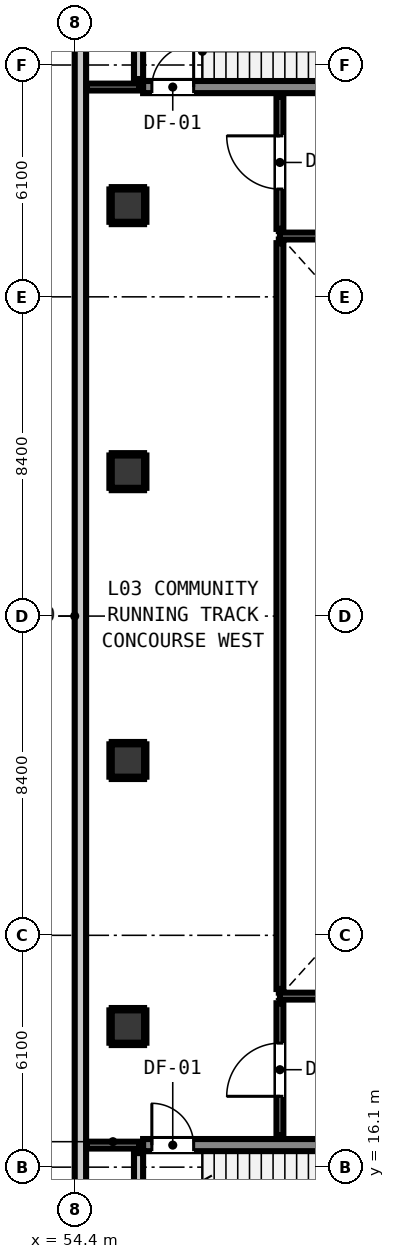
"""IFC4 building model, lengths in metres.
Left out: names, types, materials, properties, quantities, classifications, styles, units other than length and angle.
Written with IfcOpenShell. Run it as: python <this file> out.ifc"""

import sys

from ifc_helpers import new_model, si_unit, direction, frame, frame_2d, origin, origin_2d, place, context, subcontext, project, spatial, rectangle, extrude, element, fill, save


model = new_model("IFC4")
c1 = context("Model", 3, precision=1e-05, world=origin(), true_north=direction((0.0, 1.0)))
c2 = subcontext(c1, "Body", "Model", "MODEL_VIEW")
j1 = project(units=[si_unit("LENGTHUNIT", "METRE"), si_unit("PLANEANGLEUNIT", "RADIAN")], contexts=[c1])
p1 = place(None, origin())
s1 = spatial("IfcSite", under=j1, at=p1, CompositionType="ELEMENT")
p2 = place(p1, origin())
s2 = spatial("IfcBuilding", under=s1, at=p2, CompositionType="ELEMENT")
p3 = place(p2, frame((0.0, 0.0, 13.6)))
s3 = spatial("IfcBuildingStorey", under=s2, at=p3, CompositionType="ELEMENT", Elevation=13.6)
p4 = place(p3, frame((56.2, 16.68, 0.0), z_axis=(0.0, 0.0, 1.0), x_axis=(1.0, 0.0, 0.0)))
e1 = element("IfcWall", 1, at=p4, inside=s3, PredefinedType="SHEAR", context=c2, shape_type="SweptSolid", body=[
    extrude(rectangle(XDim=8.4, YDim=0.32, at=frame_2d((4.2, 0.0))), origin(), (0.0, 0.0, 1.0), 4.2),
])
p5 = place(p4, frame((0.23, 0.0, 0.0)))
e2 = element("IfcOpeningElement", 2, at=p5, cuts=e1, PredefinedType="OPENING", context=c2, shape_type="SweptSolid", body=[
    extrude(rectangle(XDim=1.1, YDim=2.15, at=frame_2d((0.55, 1.075))), frame((0.0, 0.17, 0.0), z_axis=(0.0, -1.0, 0.0), x_axis=(1.0, 0.0, 0.0)), (0.0, 0.0, 1.0), 0.34),
])
p6 = place(p3, frame((56.2, 44.52, 0.0), z_axis=(0.0, 0.0, 1.0), x_axis=(1.0, 0.0, 0.0)))
e3 = element("IfcWall", 3, at=p6, inside=s3, PredefinedType="SHEAR", context=c2, shape_type="SweptSolid", body=[
    extrude(rectangle(XDim=8.4, YDim=0.32, at=frame_2d((4.2, 0.0))), origin(), (0.0, 0.0, 1.0), 4.2),
])
p7 = place(p6, frame((0.23, 0.0, 0.0)))
e4 = element("IfcOpeningElement", 4, at=p7, cuts=e3, PredefinedType="OPENING", context=c2, shape_type="SweptSolid", body=[
    extrude(rectangle(XDim=1.1, YDim=2.15, at=frame_2d((0.55, 1.075))), frame((0.0, 0.17, 0.0), z_axis=(0.0, -1.0, 0.0), x_axis=(1.0, 0.0, 0.0)), (0.0, 0.0, 1.0), 0.34),
])
for number, where, z_axis, x_axis in (
    (5, (55.8, 19.8, 0.0), (0.0, 0.0, 1.0), (1.0, 0.0, 0.0)),
    (6, (55.8, 26.8, 0.0), (0.0, 0.0, 1.0), (1.0, 0.0, 0.0)),
    (7, (55.8, 34.4, 0.0), (0.0, 0.0, 1.0), (1.0, 0.0, 0.0)),
    (8, (55.8, 41.4, 0.0), (0.0, 0.0, 1.0), (1.0, 0.0, 0.0)),
):
    element("IfcColumn", number, at=place(p3, frame(where, z_axis=z_axis, x_axis=x_axis)), inside=s3, PredefinedType="COLUMN", context=c2, shape_type="SweptSolid", body=[
        extrude(rectangle(XDim=0.85, YDim=0.85, at=origin_2d()), origin(), (0.0, 0.0, 1.0), 4.2),
    ])
p8 = place(p3, frame((54.55, 12.9, 0.0), z_axis=(0.0, 0.0, 1.0), x_axis=(0.0, 1.0, 0.0)))
e9 = element("IfcWall", 9, at=p8, inside=s3, PredefinedType="STANDARD", context=c2, shape_type="SweptSolid", body=[
    extrude(rectangle(XDim=35.4, YDim=0.3, at=frame_2d((17.7, 0.0))), origin(), (0.0, 0.0, 1.0), 3.92),
])
for number, where, z_axis, x_axis in (
    (10, (56.08, 14.357, 0.0), (0.0, 0.0, 1.0), (0.0, 1.0, 0.0)),
    (11, (56.08, 44.73, 0.0), (0.0, 0.0, 1.0), (0.0, 1.0, 0.0)),
):
    element("IfcWall", number, at=place(p3, frame(where, z_axis=z_axis, x_axis=x_axis)), inside=s3, PredefinedType="PARTITIONING", context=c2, shape_type="SweptSolid", body=[
        extrude(rectangle(XDim=2.113, YDim=0.24, at=frame_2d((1.057, 0.0))), origin(), (0.0, 0.0, 1.0), 3.155),
    ])
p9 = place(p3, frame((54.712, 16.68, 0.0), z_axis=(0.0, 0.0, 1.0), x_axis=(1.0, 0.0, 0.0)))
e12 = element("IfcWall", 12, at=p9, inside=s3, PredefinedType="PARTITIONING", context=c2, shape_type="SweptSolid", body=[
    extrude(rectangle(XDim=1.388, YDim=0.18, at=frame_2d((0.694, 0.0))), origin(), (0.0, 0.0, 1.0), 3.78),
])
for number, where, z_axis, x_axis in (
    (13, (59.8, 20.6, 0.0), (0.0, 0.0, 1.0), (1.0, 0.0, 0.0)),
    (14, (59.8, 40.6, 0.0), (0.0, 0.0, 1.0), (1.0, 0.0, 0.0)),
):
    element("IfcWall", number, at=place(p3, frame(where, z_axis=z_axis, x_axis=x_axis)), inside=s3, PredefinedType="PARTITIONING", context=c2, shape_type="SweptSolid", body=[
        extrude(rectangle(XDim=18.0, YDim=0.18, at=frame_2d((9.0, 0.0))), origin(), (0.0, 0.0, 1.0), 3.78),
    ])
p10 = place(p3, frame((54.712, 44.52, 0.0), z_axis=(0.0, 0.0, 1.0), x_axis=(1.0, 0.0, 0.0)))
e15 = element("IfcWall", 15, at=p10, inside=s3, PredefinedType="PARTITIONING", context=c2, shape_type="SweptSolid", body=[
    extrude(rectangle(XDim=1.388, YDim=0.18, at=frame_2d((0.694, 0.0))), origin(), (0.0, 0.0, 1.0), 3.78),
])
p11 = place(p3, frame((59.8, 16.94, 0.0), z_axis=(0.0, 0.0, 1.0), x_axis=(0.0, 1.0, 0.0)))
e16 = element("IfcWall", 16, at=p11, inside=s3, PredefinedType="PARTITIONING", context=c2, shape_type="SweptSolid", body=[
    extrude(rectangle(XDim=3.472, YDim=0.18, at=frame_2d((1.736, 0.0))), origin(), (0.0, 0.0, 1.0), 3.78),
])
p12 = place(p11, frame((1.024, 0.0, 0.0)))
e17 = element("IfcOpeningElement", 17, at=p12, cuts=e16, PredefinedType="OPENING", context=c2, shape_type="SweptSolid", body=[
    extrude(rectangle(XDim=1.4, YDim=2.15, at=frame_2d((0.7, 1.075))), frame((0.0, 0.1, 0.0), z_axis=(0.0, -1.0, 0.0), x_axis=(1.0, 0.0, 0.0)), (0.0, 0.0, 1.0), 0.2),
])
p13 = place(p3, frame((59.8, 20.788, 0.0), z_axis=(0.0, 0.0, 1.0), x_axis=(0.0, 1.0, 0.0)))
e18 = element("IfcWall", 18, at=p13, inside=s3, PredefinedType="PARTITIONING", context=c2, shape_type="SweptSolid", body=[
    extrude(rectangle(XDim=19.624, YDim=0.18, at=frame_2d((9.812, 0.0))), origin(), (0.0, 0.0, 1.0), 3.78),
])
p14 = place(p3, frame((59.8, 40.788, 0.0), z_axis=(0.0, 0.0, 1.0), x_axis=(0.0, 1.0, 0.0)))
e19 = element("IfcWall", 19, at=p14, inside=s3, PredefinedType="PARTITIONING", context=c2, shape_type="SweptSolid", body=[
    extrude(rectangle(XDim=3.472, YDim=0.18, at=frame_2d((1.736, 0.0))), origin(), (0.0, 0.0, 1.0), 3.78),
])
p15 = place(p14, frame((1.048, 0.0, 0.0)))
e20 = element("IfcOpeningElement", 20, at=p15, cuts=e19, PredefinedType="OPENING", context=c2, shape_type="SweptSolid", body=[
    extrude(rectangle(XDim=1.4, YDim=2.15, at=frame_2d((0.7, 1.075))), frame((0.0, 0.1, 0.0), z_axis=(0.0, -1.0, 0.0), x_axis=(1.0, 0.0, 0.0)), (0.0, 0.0, 1.0), 0.2),
])
for number, where, z_axis, x_axis in (
    (21, (55.375, 19.343, 0.0), (0.0, 0.0, 1.0), (1.0, 0.0, 0.0)),
    (22, (55.375, 20.257, 0.0), (0.0, 0.0, 1.0), (1.0, 0.0, 0.0)),
    (23, (55.343, 19.375, 0.0), (0.0, 0.0, 1.0), (0.0, 1.0, 0.0)),
    (24, (56.257, 19.375, 0.0), (0.0, 0.0, 1.0), (0.0, 1.0, 0.0)),
    (25, (55.375, 26.343, 0.0), (0.0, 0.0, 1.0), (1.0, 0.0, 0.0)),
    (26, (55.375, 27.257, 0.0), (0.0, 0.0, 1.0), (1.0, 0.0, 0.0)),
    (27, (55.343, 26.375, 0.0), (0.0, 0.0, 1.0), (0.0, 1.0, 0.0)),
    (28, (56.257, 26.375, 0.0), (0.0, 0.0, 1.0), (0.0, 1.0, 0.0)),
    (29, (55.375, 33.943, 0.0), (0.0, 0.0, 1.0), (1.0, 0.0, 0.0)),
    (30, (55.375, 34.857, 0.0), (0.0, 0.0, 1.0), (1.0, 0.0, 0.0)),
):
    element("IfcWall", number, at=place(p3, frame(where, z_axis=z_axis, x_axis=x_axis)), inside=s3, PredefinedType="PARTITIONING", context=c2, shape_type="SweptSolid", body=[
        extrude(rectangle(XDim=0.85, YDim=0.06, at=frame_2d((0.425, 0.0))), origin(), (0.0, 0.0, 1.0), 1.45),
    ])
for number, where, z_axis, x_axis in (
    (31, (55.343, 33.975, 0.0), (0.0, 0.0, 1.0), (0.0, 1.0, 0.0)),
    (32, (56.257, 33.975, 0.0), (0.0, 0.0, 1.0), (0.0, 1.0, 0.0)),
):
    element("IfcWall", number, at=place(p3, frame(where, z_axis=z_axis, x_axis=x_axis)), inside=s3, PredefinedType="PARTITIONING", context=c2, shape_type="SweptSolid", body=[
        extrude(rectangle(XDim=0.85, YDim=0.06, at=frame_2d((0.425, 0.0))), origin(), (0.0, 0.0, 1.0), 1.45),
    ])
for number, where, z_axis, x_axis in (
    (33, (55.375, 40.943, 0.0), (0.0, 0.0, 1.0), (1.0, 0.0, 0.0)),
    (34, (55.375, 41.857, 0.0), (0.0, 0.0, 1.0), (1.0, 0.0, 0.0)),
):
    element("IfcWall", number, at=place(p3, frame(where, z_axis=z_axis, x_axis=x_axis)), inside=s3, PredefinedType="PARTITIONING", context=c2, shape_type="SweptSolid", body=[
        extrude(rectangle(XDim=0.85, YDim=0.06, at=frame_2d((0.425, 0.0))), origin(), (0.0, 0.0, 1.0), 1.45),
    ])
for number, where, z_axis, x_axis in (
    (35, (55.343, 40.975, 0.0), (0.0, 0.0, 1.0), (0.0, 1.0, 0.0)),
    (36, (56.257, 40.975, 0.0), (0.0, 0.0, 1.0), (0.0, 1.0, 0.0)),
):
    element("IfcWall", number, at=place(p3, frame(where, z_axis=z_axis, x_axis=x_axis)), inside=s3, PredefinedType="PARTITIONING", context=c2, shape_type="SweptSolid", body=[
        extrude(rectangle(XDim=0.85, YDim=0.06, at=frame_2d((0.425, 0.0))), origin(), (0.0, 0.0, 1.0), 1.45),
    ])
p16 = place(p5, origin())
e37 = element("IfcDoor", 37, at=p16, inside=s3, OperationType="SINGLE_SWING_LEFT", PredefinedType="DOOR", context=c2, shape_type="SweptSolid", body=[
    extrude(rectangle(XDim=1.1, YDim=2.15, at=frame_2d((0.55, 1.075))), frame((0.0, 0.025, 0.0), z_axis=(0.0, -1.0, 0.0), x_axis=(1.0, 0.0, 0.0)), (0.0, 0.0, 1.0), 0.05),
])
fill(e2, e37)
p17 = place(p7, origin())
e38 = element("IfcDoor", 38, at=p17, inside=s3, OperationType="SINGLE_SWING_RIGHT", PredefinedType="DOOR", context=c2, shape_type="SweptSolid", body=[
    extrude(rectangle(XDim=1.1, YDim=2.15, at=frame_2d((0.55, 1.075))), frame((0.0, 0.025, 0.0), z_axis=(0.0, -1.0, 0.0), x_axis=(1.0, 0.0, 0.0)), (0.0, 0.0, 1.0), 0.05),
])
fill(e4, e38)
p18 = place(p12, origin())
e39 = element("IfcDoor", 39, at=p18, inside=s3, OperationType="SINGLE_SWING_LEFT", PredefinedType="DOOR", context=c2, shape_type="SweptSolid", body=[
    extrude(rectangle(XDim=1.4, YDim=2.15, at=frame_2d((0.7, 1.075))), frame((0.0, 0.025, 0.0), z_axis=(0.0, -1.0, 0.0), x_axis=(1.0, 0.0, 0.0)), (0.0, 0.0, 1.0), 0.05),
])
fill(e17, e39)
p19 = place(p15, origin())
e40 = element("IfcDoor", 40, at=p19, inside=s3, OperationType="SINGLE_SWING_RIGHT", PredefinedType="DOOR", context=c2, shape_type="SweptSolid", body=[
    extrude(rectangle(XDim=1.4, YDim=2.15, at=frame_2d((0.7, 1.075))), frame((0.0, 0.025, 0.0), z_axis=(0.0, -1.0, 0.0), x_axis=(1.0, 0.0, 0.0)), (0.0, 0.0, 1.0), 0.05),
])
fill(e20, e40)
save(model, sys.argv[1])
